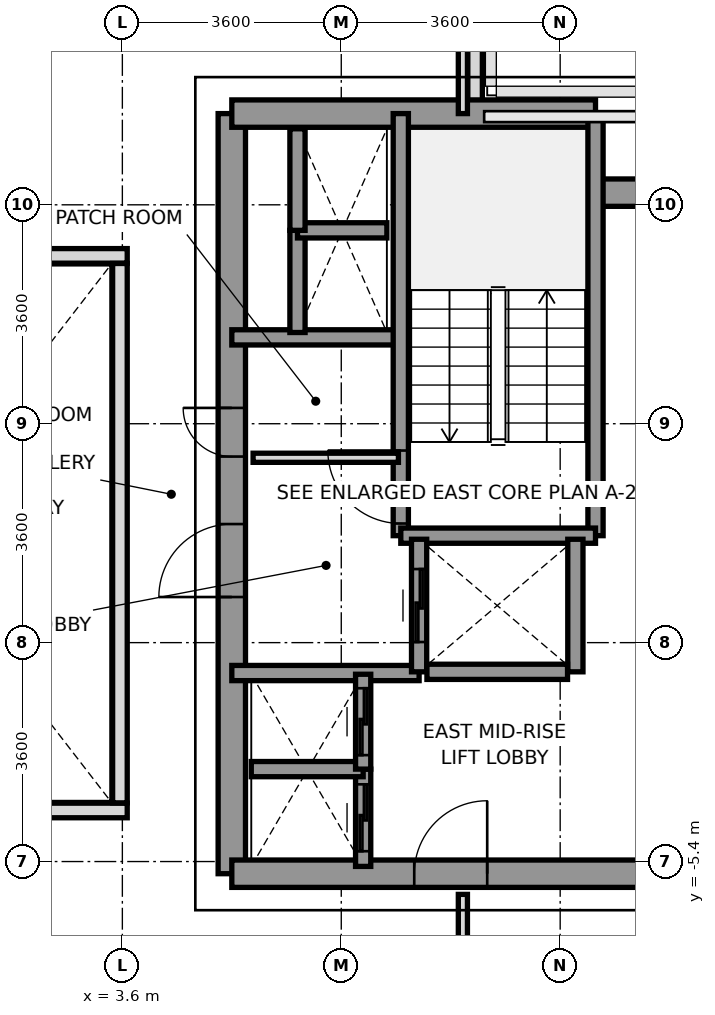
"""IFC4 building model, lengths in metres.
Left out: names, types, materials, properties, quantities, classifications, styles, units other than length and angle.
Written with IfcOpenShell. Run it as: python <this file> out.ifc"""

import sys

from ifc_helpers import new_model, si_unit, direction, frame, frame_2d, origin, place, context, subcontext, project, spatial, rectangle, extrude, source, transform, mapped, element, fill, save


model = new_model("IFC4")
c1 = context("Model", 3, precision=1e-05, world=origin(), true_north=direction((0.0, 1.0)))
c2 = subcontext(c1, "Body", "Model", "MODEL_VIEW")
j1 = project(units=[si_unit("LENGTHUNIT", "METRE"), si_unit("PLANEANGLEUNIT", "RADIAN")], contexts=[c1])
p1 = place(None, origin())
s1 = spatial("IfcSite", under=j1, at=p1, CompositionType="ELEMENT")
p2 = place(p1, origin())
s2 = spatial("IfcBuilding", under=s1, at=p2, CompositionType="ELEMENT")
p3 = place(p2, frame((0.0, 0.0, 104.0)))
s3 = spatial("IfcBuildingStorey", under=s2, at=p3, CompositionType="ELEMENT", Elevation=104.0)
p4 = place(p3, frame((9.4, 8.472, 0.0), z_axis=(0.0, 0.0, 1.0), x_axis=(0.0, -1.0, 0.0)))
e1 = element("IfcWall", 1, at=p4, inside=s3, PredefinedType="PARAPET", context=c2, shape_type="SweptSolid", body=[
    extrude(rectangle(XDim=1.519, YDim=0.24, at=frame_2d((0.76, 0.0))), origin(), (0.0, 0.0, 1.0), 1.15),
])
p5 = place(p3, frame((5.4, -5.6, 0.0), z_axis=(0.0, 0.0, 1.0), x_axis=(0.0, 1.0, 0.0)))
e2 = element("IfcWall", 2, at=p5, inside=s3, PredefinedType="SHEAR", context=c2, shape_type="SweptSolid", body=[
    extrude(rectangle(XDim=12.5, YDim=0.45, at=frame_2d((6.25, 0.0))), origin(), (0.0, 0.0, 1.0), 3.2),
])
p6 = place(p5, frame((4.55, 0.0, 0.0)))
e3 = element("IfcOpeningElement", 3, at=p6, cuts=e2, PredefinedType="OPENING", context=c2, shape_type="SweptSolid", body=[
    extrude(rectangle(XDim=1.2, YDim=2.2, at=frame_2d((0.6, 1.1))), frame((0.0, 0.235, 0.0), z_axis=(0.0, -1.0, 0.0), x_axis=(1.0, 0.0, 0.0)), (0.0, 0.0, 1.0), 0.47),
])
p7 = place(p5, frame((6.86, 0.0, 0.0)))
e4 = element("IfcOpeningElement", 4, at=p7, cuts=e2, PredefinedType="OPENING", context=c2, shape_type="SweptSolid", body=[
    extrude(rectangle(XDim=0.8, YDim=2.1, at=frame_2d((0.4, 1.05))), frame((0.0, 0.235, 0.0), z_axis=(0.0, -1.0, 0.0), x_axis=(1.0, 0.0, 0.0)), (0.0, 0.0, 1.0), 0.47),
])
p8 = place(p3, frame((5.4, 6.9, 0.0), z_axis=(0.0, 0.0, 1.0), x_axis=(1.0, 0.0, 0.0)))
e5 = element("IfcWall", 5, at=p8, inside=s3, PredefinedType="SHEAR", context=c2, shape_type="SweptSolid", body=[
    extrude(rectangle(XDim=5.981, YDim=0.45, at=frame_2d((2.991, 0.0))), origin(), (0.0, 0.0, 1.0), 3.2),
])
p9 = place(p3, frame((11.381, 5.6, 0.0), z_axis=(0.0, 0.0, 1.0), x_axis=(1.0, 0.0, 0.0)))
e6 = element("IfcWall", 6, at=p9, inside=s3, PredefinedType="SHEAR", context=c2, shape_type="SweptSolid", body=[
    extrude(rectangle(XDim=1.819, YDim=0.45, at=frame_2d((0.909, 0.0))), origin(), (0.0, 0.0, 1.0), 3.2),
])
p10 = place(p3, frame((5.4, -5.6, 0.0), z_axis=(0.0, 0.0, 1.0), x_axis=(1.0, 0.0, 0.0)))
e7 = element("IfcWall", 7, at=p10, inside=s3, PredefinedType="SHEAR", context=c2, shape_type="SweptSolid", body=[
    extrude(rectangle(XDim=7.8, YDim=0.45, at=frame_2d((3.9, 0.0))), origin(), (0.0, 0.0, 1.0), 3.2),
])
p11 = place(p10, frame((3.0, 0.0, 0.0)))
e8 = element("IfcOpeningElement", 8, at=p11, cuts=e7, PredefinedType="OPENING", context=c2, shape_type="SweptSolid", body=[
    extrude(rectangle(XDim=1.2, YDim=2.2, at=frame_2d((0.6, 1.1))), frame((0.0, 0.235, 0.0), z_axis=(0.0, -1.0, 0.0), x_axis=(1.0, 0.0, 0.0)), (0.0, 0.0, 1.0), 0.47),
])
p12 = place(p3, frame((5.4, 3.22, 0.0), z_axis=(0.0, 0.0, 1.0), x_axis=(1.0, 0.0, 0.0)))
e9 = element("IfcWall", 9, at=p12, inside=s3, PredefinedType="SOLIDWALL", context=c2, shape_type="SweptSolid", body=[
    extrude(rectangle(XDim=2.78, YDim=0.25, at=frame_2d((1.39, 0.0))), origin(), (0.0, 0.0, 1.0), 3.2),
])
p13 = place(p3, frame((5.4, -2.3, 0.0), z_axis=(0.0, 0.0, 1.0), x_axis=(1.0, 0.0, 0.0)))
e10 = element("IfcWall", 10, at=p13, inside=s3, PredefinedType="SOLIDWALL", context=c2, shape_type="SweptSolid", body=[
    extrude(rectangle(XDim=3.08, YDim=0.25, at=frame_2d((1.54, 0.0))), origin(), (0.0, 0.0, 1.0), 3.2),
])
p14 = place(p3, frame((8.179, -0.041, 0.0), z_axis=(0.0, 0.0, 1.0), x_axis=(0.0, 1.0, 0.0)))
e11 = element("IfcWall", 11, at=p14, inside=s3, PredefinedType="SOLIDWALL", context=c2, shape_type="SweptSolid", body=[
    extrude(rectangle(XDim=6.941, YDim=0.25, at=frame_2d((3.47, 0.0))), origin(), (0.0, 0.0, 1.0), 3.2),
])
p15 = place(p14, frame((0.2, 0.0, 0.0)))
e12 = element("IfcOpeningElement", 12, at=p15, cuts=e11, PredefinedType="OPENING", context=c2, shape_type="SweptSolid", body=[
    extrude(rectangle(XDim=1.2, YDim=2.2, at=frame_2d((0.6, 1.1))), frame((0.0, 0.135, 0.0), z_axis=(0.0, -1.0, 0.0), x_axis=(1.0, 0.0, 0.0)), (0.0, 0.0, 1.0), 0.27),
])
p16 = place(p3, frame((11.381, -0.041, 0.0), z_axis=(0.0, 0.0, 1.0), x_axis=(0.0, 1.0, 0.0)))
e13 = element("IfcWall", 13, at=p16, inside=s3, PredefinedType="SOLIDWALL", context=c2, shape_type="SweptSolid", body=[
    extrude(rectangle(XDim=6.941, YDim=0.25, at=frame_2d((3.47, 0.0))), origin(), (0.0, 0.0, 1.0), 3.2),
])
p17 = place(p3, frame((8.179, -0.041, 0.0), z_axis=(0.0, 0.0, 1.0), x_axis=(1.0, 0.0, 0.0)))
e14 = element("IfcWall", 14, at=p17, inside=s3, PredefinedType="SOLIDWALL", context=c2, shape_type="SweptSolid", body=[
    extrude(rectangle(XDim=3.202, YDim=0.25, at=frame_2d((1.601, 0.0))), origin(), (0.0, 0.0, 1.0), 3.2),
])
p18 = place(p3, frame((8.48, -2.28, 0.0), z_axis=(0.0, 0.0, 1.0), x_axis=(0.0, 1.0, 0.0)))
e15 = element("IfcWall", 15, at=p18, inside=s3, PredefinedType="SOLIDWALL", context=c2, shape_type="SweptSolid", body=[
    extrude(rectangle(XDim=2.18, YDim=0.25, at=frame_2d((1.09, 0.0))), origin(), (0.0, 0.0, 1.0), 3.2),
])
p19 = place(p18, frame((0.49, 0.0, 0.0)))
e16 = element("IfcOpeningElement", 16, at=p19, cuts=e15, PredefinedType="OPENING", context=c2, shape_type="SweptSolid", body=[
    extrude(rectangle(XDim=1.2, YDim=2.2, at=frame_2d((0.6, 1.1))), frame((0.0, 0.135, 0.0), z_axis=(0.0, -1.0, 0.0), x_axis=(1.0, 0.0, 0.0)), (0.0, 0.0, 1.0), 0.27),
])
p20 = place(p3, frame((11.05, -2.28, 0.0), z_axis=(0.0, 0.0, 1.0), x_axis=(0.0, 1.0, 0.0)))
e17 = element("IfcWall", 17, at=p20, inside=s3, PredefinedType="SOLIDWALL", context=c2, shape_type="SweptSolid", body=[
    extrude(rectangle(XDim=2.18, YDim=0.25, at=frame_2d((1.09, 0.0))), origin(), (0.0, 0.0, 1.0), 3.2),
])
p21 = place(p3, frame((8.609, -2.28, 0.0), z_axis=(0.0, 0.0, 1.0), x_axis=(1.0, 0.0, 0.0)))
e18 = element("IfcWall", 18, at=p21, inside=s3, PredefinedType="SOLIDWALL", context=c2, shape_type="SweptSolid", body=[
    extrude(rectangle(XDim=2.312, YDim=0.25, at=frame_2d((1.156, 0.0))), origin(), (0.0, 0.0, 1.0), 3.2),
])
p22 = place(p3, frame((7.56, -5.48, 0.0), z_axis=(0.0, 0.0, 1.0), x_axis=(0.0, 1.0, 0.0)))
e19 = element("IfcWall", 19, at=p22, inside=s3, PredefinedType="SOLIDWALL", context=c2, shape_type="SweptSolid", body=[
    extrude(rectangle(XDim=1.6, YDim=0.25, at=frame_2d((0.8, 0.0))), origin(), (0.0, 0.0, 1.0), 3.2),
])
p23 = place(p22, frame((0.25, 0.0, 0.0)))
e20 = element("IfcOpeningElement", 20, at=p23, cuts=e19, PredefinedType="OPENING", context=c2, shape_type="SweptSolid", body=[
    extrude(rectangle(XDim=1.1, YDim=2.2, at=frame_2d((0.55, 1.1))), frame((0.0, 0.135, 0.0), z_axis=(0.0, -1.0, 0.0), x_axis=(1.0, 0.0, 0.0)), (0.0, 0.0, 1.0), 0.27),
])
p24 = place(p3, frame((5.72, -3.88, 0.0), z_axis=(0.0, 0.0, 1.0), x_axis=(1.0, 0.0, 0.0)))
e21 = element("IfcWall", 21, at=p24, inside=s3, PredefinedType="SOLIDWALL", context=c2, shape_type="SweptSolid", body=[
    extrude(rectangle(XDim=1.84, YDim=0.25, at=frame_2d((0.92, 0.0))), origin(), (0.0, 0.0, 1.0), 3.2),
])
p25 = place(p3, frame((7.56, -3.88, 0.0), z_axis=(0.0, 0.0, 1.0), x_axis=(0.0, 1.0, 0.0)))
e22 = element("IfcWall", 22, at=p25, inside=s3, PredefinedType="SOLIDWALL", context=c2, shape_type="SweptSolid", body=[
    extrude(rectangle(XDim=1.56, YDim=0.25, at=frame_2d((0.78, 0.0))), origin(), (0.0, 0.0, 1.0), 3.2),
])
p26 = place(p25, frame((0.23, 0.0, 0.0)))
e23 = element("IfcOpeningElement", 23, at=p26, cuts=e22, PredefinedType="OPENING", context=c2, shape_type="SweptSolid", body=[
    extrude(rectangle(XDim=1.1, YDim=2.2, at=frame_2d((0.55, 1.1))), frame((0.0, 0.135, 0.0), z_axis=(0.0, -1.0, 0.0), x_axis=(1.0, 0.0, 0.0)), (0.0, 0.0, 1.0), 0.27),
])
p27 = place(p3, frame((6.48, 3.3, 0.0), z_axis=(0.0, 0.0, 1.0), x_axis=(0.0, 1.0, 0.0)))
e24 = element("IfcWall", 24, at=p27, inside=s3, PredefinedType="SOLIDWALL", context=c2, shape_type="SweptSolid", body=[
    extrude(rectangle(XDim=1.68, YDim=0.25, at=frame_2d((0.84, 0.0))), origin(), (0.0, 0.0, 1.0), 3.2),
])
p28 = place(p3, frame((6.48, 4.98, 0.0), z_axis=(0.0, 0.0, 1.0), x_axis=(1.0, 0.0, 0.0)))
e25 = element("IfcWall", 25, at=p28, inside=s3, PredefinedType="SOLIDWALL", context=c2, shape_type="SweptSolid", body=[
    extrude(rectangle(XDim=1.47, YDim=0.25, at=frame_2d((0.735, 0.0))), origin(), (0.0, 0.0, 1.0), 3.2),
])
p29 = place(p3, frame((6.48, 4.98, 0.0), z_axis=(0.0, 0.0, 1.0), x_axis=(0.0, 1.0, 0.0)))
e26 = element("IfcWall", 26, at=p29, inside=s3, PredefinedType="SOLIDWALL", context=c2, shape_type="SweptSolid", body=[
    extrude(rectangle(XDim=1.67, YDim=0.25, at=frame_2d((0.835, 0.0))), origin(), (0.0, 0.0, 1.0), 3.2),
])
p30 = place(p3, frame((5.75, 1.24, 0.0), z_axis=(0.0, 0.0, 1.0), x_axis=(1.0, 0.0, 0.0)))
e27 = element("IfcWall", 27, at=p30, inside=s3, PredefinedType="PARTITIONING", context=c2, shape_type="SweptSolid", body=[
    extrude(rectangle(XDim=2.39, YDim=0.15, at=frame_2d((1.195, 0.0))), origin(), (0.0, 0.0, 1.0), 2.3),
])
p31 = place(p3, frame((9.2, 6.9, 0.0), z_axis=(0.0, 0.0, 1.0), x_axis=(0.0, 1.0, 0.0)))
e28 = element("IfcWall", 28, at=p31, inside=s3, PredefinedType="PARTITIONING", context=c2, shape_type="SweptSolid", body=[
    extrude(rectangle(XDim=8.78, YDim=0.15, at=frame_2d((4.39, 0.0))), origin(), (0.0, 0.0, 1.0), 2.7),
])
p32 = place(p3, frame((9.2, -15.68, 0.0), z_axis=(0.0, 0.0, 1.0), x_axis=(0.0, 1.0, 0.0)))
e29 = element("IfcWall", 29, at=p32, inside=s3, PredefinedType="PARTITIONING", context=c2, shape_type="SweptSolid", body=[
    extrude(rectangle(XDim=9.74, YDim=0.15, at=frame_2d((4.87, 0.0))), origin(), (0.0, 0.0, 1.0), 2.7),
])
for number, where, z_axis, x_axis in (
    (30, (-3.68, -4.56, 0.0), (0.0, 0.0, 1.0), (1.0, 0.0, 0.0)),
    (31, (-3.68, 4.56, 0.0), (0.0, 0.0, 1.0), (1.0, 0.0, 0.0)),
):
    element("IfcWall", number, at=place(p3, frame(where, z_axis=z_axis, x_axis=x_axis)), inside=s3, PredefinedType="PARAPET", context=c2, shape_type="SweptSolid", body=[
        extrude(rectangle(XDim=7.36, YDim=0.24, at=frame_2d((3.68, 0.0))), origin(), (0.0, 0.0, 1.0), 1.15),
    ])
p33 = place(p3, frame((3.56, -4.435, 0.0), z_axis=(0.0, 0.0, 1.0), x_axis=(0.0, 1.0, 0.0)))
e32 = element("IfcWall", 32, at=p33, inside=s3, PredefinedType="PARAPET", context=c2, shape_type="SweptSolid", body=[
    extrude(rectangle(XDim=8.87, YDim=0.24, at=frame_2d((4.435, 0.0))), origin(), (0.0, 0.0, 1.0), 1.15),
])
m1 = source(origin(), c2, "Body", "SweptSolid", [
    extrude(rectangle(XDim=1.2, YDim=2.2, at=frame_2d((0.6, 1.1))), frame((0.0, 0.025, 0.0), z_axis=(0.0, -1.0, 0.0), x_axis=(1.0, 0.0, 0.0)), (0.0, 0.0, 1.0), 0.05),
])
p34 = place(p15, origin())
e33 = element("IfcDoor", 33, at=p34, inside=s3, OperationType="SINGLE_SWING_RIGHT", PredefinedType="DOOR", context=c2, shape_type="MappedRepresentation", body=[
    mapped(m1, transform((0.0, 0.0, 0.0), x_axis=(1.0, 0.0, 0.0), y_axis=(0.0, 1.0, 0.0), z_axis=(0.0, 0.0, 1.0), scale=1.0)),
])
fill(e12, e33)
p35 = place(p6, origin())
e34 = element("IfcDoor", 34, at=p35, inside=s3, OperationType="SINGLE_SWING_LEFT", PredefinedType="DOOR", context=c2, shape_type="MappedRepresentation", body=[
    mapped(m1, transform((0.0, 0.0, 0.0), x_axis=(1.0, 0.0, 0.0), y_axis=(0.0, 1.0, 0.0), z_axis=(0.0, 0.0, 1.0), scale=1.0)),
])
fill(e3, e34)
p36 = place(p11, origin())
e35 = element("IfcDoor", 35, at=p36, inside=s3, OperationType="SINGLE_SWING_RIGHT", PredefinedType="DOOR", context=c2, shape_type="MappedRepresentation", body=[
    mapped(m1, transform((0.0, 0.0, 0.0), x_axis=(1.0, 0.0, 0.0), y_axis=(0.0, 1.0, 0.0), z_axis=(0.0, 0.0, 1.0), scale=1.0)),
])
fill(e8, e35)
m2 = source(origin(), c2, "Body", "SweptSolid", [
    extrude(rectangle(XDim=0.8, YDim=2.1, at=frame_2d((0.4, 1.05))), frame((0.0, 0.025, 0.0), z_axis=(0.0, -1.0, 0.0), x_axis=(1.0, 0.0, 0.0)), (0.0, 0.0, 1.0), 0.05),
])
p37 = place(p7, origin())
e36 = element("IfcDoor", 36, at=p37, inside=s3, OperationType="SINGLE_SWING_RIGHT", PredefinedType="DOOR", context=c2, shape_type="MappedRepresentation", body=[
    mapped(m2, transform((0.0, 0.0, 0.0), x_axis=(1.0, 0.0, 0.0), y_axis=(0.0, 1.0, 0.0), z_axis=(0.0, 0.0, 1.0), scale=1.0)),
])
fill(e4, e36)
p38 = place(p19, origin())
e37 = element("IfcDoor", 37, at=p38, inside=s3, OperationType="SLIDING_TO_RIGHT", PredefinedType="DOOR", context=c2, shape_type="MappedRepresentation", body=[
    mapped(m1, transform((0.0, 0.0, 0.0), x_axis=(1.0, 0.0, 0.0), y_axis=(0.0, 1.0, 0.0), z_axis=(0.0, 0.0, 1.0), scale=1.0)),
])
fill(e16, e37)
m3 = source(origin(), c2, "Body", "SweptSolid", [
    extrude(rectangle(XDim=1.1, YDim=2.2, at=frame_2d((0.55, 1.1))), frame((0.0, 0.025, 0.0), z_axis=(0.0, -1.0, 0.0), x_axis=(1.0, 0.0, 0.0)), (0.0, 0.0, 1.0), 0.05),
])
p39 = place(p23, origin())
e38 = element("IfcDoor", 38, at=p39, inside=s3, OperationType="SLIDING_TO_LEFT", PredefinedType="DOOR", context=c2, shape_type="MappedRepresentation", body=[
    mapped(m3, transform((0.0, 0.0, 0.0), x_axis=(1.0, 0.0, 0.0), y_axis=(0.0, 1.0, 0.0), z_axis=(0.0, 0.0, 1.0), scale=1.0)),
])
fill(e20, e38)
p40 = place(p26, origin())
e39 = element("IfcDoor", 39, at=p40, inside=s3, OperationType="SLIDING_TO_LEFT", PredefinedType="DOOR", context=c2, shape_type="MappedRepresentation", body=[
    mapped(m3, transform((0.0, 0.0, 0.0), x_axis=(1.0, 0.0, 0.0), y_axis=(0.0, 1.0, 0.0), z_axis=(0.0, 0.0, 1.0), scale=1.0)),
])
fill(e23, e39)
save(model, sys.argv[1])
